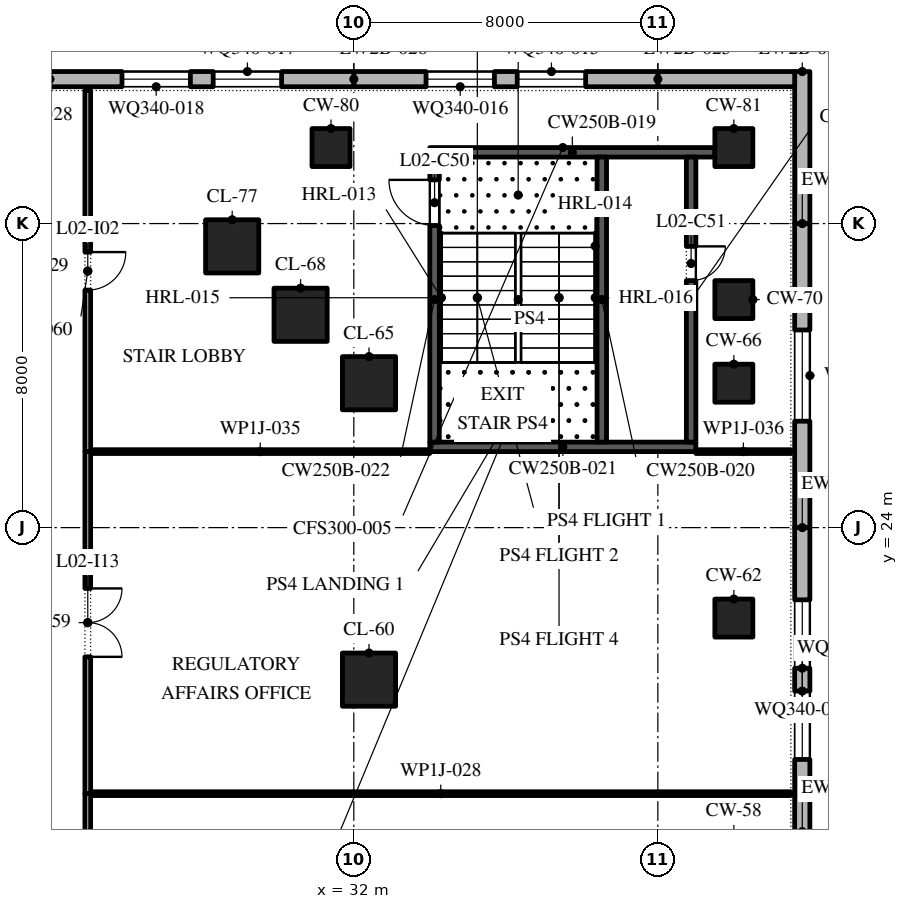
"""IFC4 building model, lengths in metres.
Left out: names, types, materials, properties, quantities, classifications, styles, units other than length and angle.
Written with IfcOpenShell. Run it as: python <this file> out.ifc"""

import sys

from ifc_helpers import new_model, si_unit, direction, frame, frame_2d, origin, origin_2d, place, context, subcontext, project, spatial, polyline, rectangle, outline, extrude, element, fill, save


model = new_model("IFC4")
c1 = context("Model", 3, precision=1e-05, world=origin(), true_north=direction((0.0, 1.0)))
c2 = subcontext(c1, "Body", "Model", "MODEL_VIEW")
j1 = project(units=[si_unit("LENGTHUNIT", "METRE"), si_unit("PLANEANGLEUNIT", "RADIAN")], contexts=[c1])
p1 = place(None, origin())
s1 = spatial("IfcSite", under=j1, at=p1, CompositionType="ELEMENT")
p2 = place(p1, origin())
s2 = spatial("IfcBuilding", under=s1, at=p2, CompositionType="ELEMENT")
p3 = place(p2, frame((0.0, 0.0, 14.0)))
s3 = spatial("IfcBuildingStorey", under=s2, at=p3, CompositionType="ELEMENT", Elevation=14.0)
p4 = place(p3, frame((32.4, 20.0, 0.0), z_axis=(0.0, 0.0, 1.0), x_axis=(1.0, 0.0, 0.0)))
e1 = element("IfcColumn", 1, at=p4, inside=s3, PredefinedType="COLUMN", context=c2, shape_type="SweptSolid", body=[
    extrude(rectangle(XDim=1.4, YDim=1.4, at=origin_2d()), origin(), (0.0, 0.0, 1.0), 5.2),
])
p5 = place(p3, frame((42.0, 21.62, 0.0), z_axis=(0.0, 0.0, 1.0), x_axis=(1.0, 0.0, 0.0)))
e2 = element("IfcColumn", 2, at=p5, inside=s3, PredefinedType="COLUMN", context=c2, shape_type="SweptSolid", body=[
    extrude(rectangle(XDim=1.0, YDim=1.0, at=origin_2d()), origin(), (0.0, 0.0, 1.0), 5.2),
])
p6 = place(p3, frame((32.4, 27.8, 0.0), z_axis=(0.0, 0.0, 1.0), x_axis=(1.0, 0.0, 0.0)))
e3 = element("IfcColumn", 3, at=p6, inside=s3, PredefinedType="COLUMN", context=c2, shape_type="SweptSolid", body=[
    extrude(rectangle(XDim=1.4, YDim=1.4, at=origin_2d()), origin(), (0.0, 0.0, 1.0), 5.2),
])
p7 = place(p3, frame((42.0, 27.8, 0.0), z_axis=(0.0, 0.0, 1.0), x_axis=(1.0, 0.0, 0.0)))
e4 = element("IfcColumn", 4, at=p7, inside=s3, PredefinedType="COLUMN", context=c2, shape_type="SweptSolid", body=[
    extrude(rectangle(XDim=1.0, YDim=1.0, at=origin_2d()), origin(), (0.0, 0.0, 1.0), 5.2),
])
p8 = place(p3, frame((30.6, 29.6, 0.0), z_axis=(0.0, 0.0, 1.0), x_axis=(1.0, 0.0, 0.0)))
e5 = element("IfcColumn", 5, at=p8, inside=s3, PredefinedType="COLUMN", context=c2, shape_type="SweptSolid", body=[
    extrude(rectangle(XDim=1.4, YDim=1.4, at=origin_2d()), origin(), (0.0, 0.0, 1.0), 5.2),
])
p9 = place(p3, frame((42.0, 30.0, 0.0), z_axis=(0.0, 0.0, 1.0), x_axis=(1.0, 0.0, 0.0)))
e6 = element("IfcColumn", 6, at=p9, inside=s3, PredefinedType="COLUMN", context=c2, shape_type="SweptSolid", body=[
    extrude(rectangle(XDim=1.0, YDim=1.0, at=origin_2d()), origin(), (0.0, 0.0, 1.0), 5.2),
])
p10 = place(p3, frame((28.8, 31.4, 0.0), z_axis=(0.0, 0.0, 1.0), x_axis=(1.0, 0.0, 0.0)))
e7 = element("IfcColumn", 7, at=p10, inside=s3, PredefinedType="COLUMN", context=c2, shape_type="SweptSolid", body=[
    extrude(rectangle(XDim=1.4, YDim=1.4, at=origin_2d()), origin(), (0.0, 0.0, 1.0), 5.2),
])
for number, where, z_axis, x_axis in (
    (8, (31.4, 34.0, 0.0), (0.0, 0.0, 1.0), (1.0, 0.0, 0.0)),
    (9, (42.0, 34.0, 0.0), (0.0, 0.0, 1.0), (1.0, 0.0, 0.0)),
):
    element("IfcColumn", number, at=place(p3, frame(where, z_axis=z_axis, x_axis=x_axis)), inside=s3, PredefinedType="COLUMN", context=c2, shape_type="SweptSolid", body=[
        extrude(rectangle(XDim=1.0, YDim=1.0, at=origin_2d()), origin(), (0.0, 0.0, 1.0), 5.2),
    ])
p11 = place(p3, frame((43.8, 16.0, 0.0), z_axis=(0.0, 0.0, 1.0), x_axis=(0.0, 1.0, 0.0)))
e10 = element("IfcWall", 10, at=p11, inside=s3, PredefinedType="STANDARD", context=c2, shape_type="SweptSolid", body=[
    extrude(rectangle(XDim=8.0, YDim=0.4, at=frame_2d((4.0, 0.0))), origin(), (0.0, 0.0, 1.0), 4.9),
])
p12 = place(p11, frame((1.9, 0.0, 0.9)))
e11 = element("IfcOpeningElement", 11, at=p12, cuts=e10, PredefinedType="OPENING", context=c2, shape_type="SweptSolid", body=[
    extrude(outline(polyline([(0.0, 0.0), (1.8, 0.0), (1.8, 1.841), (1.785, 2.076), (1.739, 2.307), (1.663, 2.53), (1.559, 2.741), (1.428, 2.937), (1.273, 3.114), (1.096, 3.269), (0.9, 3.4), (0.704, 3.269), (0.527, 3.114), (0.372, 2.937), (0.241, 2.741), (0.137, 2.53), (0.061, 2.307), (0.015, 2.076), (0.0, 1.841), (0.0, 0.0)])), frame((0.0, 0.21, 0.0), z_axis=(0.0, -1.0, 0.0), x_axis=(1.0, 0.0, 0.0)), (0.0, 0.0, 1.0), 0.42),
])
p13 = place(p11, frame((4.3, 0.0, 0.9)))
e12 = element("IfcOpeningElement", 12, at=p13, cuts=e10, PredefinedType="OPENING", context=c2, shape_type="SweptSolid", body=[
    extrude(outline(polyline([(0.0, 0.0), (1.8, 0.0), (1.8, 1.841), (1.785, 2.076), (1.739, 2.307), (1.663, 2.53), (1.559, 2.741), (1.428, 2.937), (1.273, 3.114), (1.096, 3.269), (0.9, 3.4), (0.704, 3.269), (0.527, 3.114), (0.372, 2.937), (0.241, 2.741), (0.137, 2.53), (0.061, 2.307), (0.015, 2.076), (0.0, 1.841), (0.0, 0.0)])), frame((0.0, 0.21, 0.0), z_axis=(0.0, -1.0, 0.0), x_axis=(1.0, 0.0, 0.0)), (0.0, 0.0, 1.0), 0.42),
])
p14 = place(p3, frame((43.8, 24.0, 0.0), z_axis=(0.0, 0.0, 1.0), x_axis=(0.0, 1.0, 0.0)))
e13 = element("IfcWall", 13, at=p14, inside=s3, PredefinedType="STANDARD", context=c2, shape_type="SweptSolid", body=[
    extrude(rectangle(XDim=8.0, YDim=0.4, at=frame_2d((4.0, 0.0))), origin(), (0.0, 0.0, 1.0), 4.9),
])
p15 = place(p14, frame((2.8, 0.0, 0.9)))
e14 = element("IfcOpeningElement", 14, at=p15, cuts=e13, PredefinedType="OPENING", context=c2, shape_type="SweptSolid", body=[
    extrude(outline(polyline([(0.0, 0.0), (2.4, 0.0), (2.4, 1.7), (2.379, 1.976), (2.315, 2.246), (2.212, 2.502), (2.07, 2.74), (1.893, 2.954), (1.686, 3.137), (1.453, 3.287), (1.2, 3.4), (0.947, 3.287), (0.714, 3.137), (0.507, 2.954), (0.33, 2.74), (0.188, 2.502), (0.084, 2.246), (0.021, 1.976), (0.0, 1.7), (0.0, 0.0)])), frame((0.0, 0.21, 0.0), z_axis=(0.0, -1.0, 0.0), x_axis=(1.0, 0.0, 0.0)), (0.0, 0.0, 1.0), 0.42),
])
p16 = place(p3, frame((43.8, 32.0, 0.0), z_axis=(0.0, 0.0, 1.0), x_axis=(0.0, 1.0, 0.0)))
e15 = element("IfcWall", 15, at=p16, inside=s3, PredefinedType="STANDARD", context=c2, shape_type="SweptSolid", body=[
    extrude(rectangle(XDim=4.0, YDim=0.4, at=frame_2d((2.0, 0.0))), origin(), (0.0, 0.0, 1.0), 4.9),
])
p17 = place(p3, frame((43.6, 35.8, 0.0), z_axis=(0.0, 0.0, 1.0), x_axis=(-1.0, 0.0, 0.0)))
e16 = element("IfcWall", 16, at=p17, inside=s3, PredefinedType="STANDARD", context=c2, shape_type="SweptSolid", body=[
    extrude(rectangle(XDim=3.6, YDim=0.4, at=frame_2d((1.8, 0.0))), origin(), (0.0, 0.0, 1.0), 4.9),
])
p18 = place(p3, frame((40.0, 35.8, 0.0), z_axis=(0.0, 0.0, 1.0), x_axis=(-1.0, 0.0, 0.0)))
e17 = element("IfcWall", 17, at=p18, inside=s3, PredefinedType="STANDARD", context=c2, shape_type="SweptSolid", body=[
    extrude(rectangle(XDim=8.0, YDim=0.4, at=frame_2d((4.0, 0.0))), origin(), (0.0, 0.0, 1.0), 4.9),
])
p19 = place(p18, frame((1.9, 0.0, 0.9)))
e18 = element("IfcOpeningElement", 18, at=p19, cuts=e17, PredefinedType="OPENING", context=c2, shape_type="SweptSolid", body=[
    extrude(outline(polyline([(0.0, 0.0), (1.8, 0.0), (1.8, 1.841), (1.785, 2.076), (1.739, 2.307), (1.663, 2.53), (1.559, 2.741), (1.428, 2.937), (1.273, 3.114), (1.096, 3.269), (0.9, 3.4), (0.704, 3.269), (0.527, 3.114), (0.372, 2.937), (0.241, 2.741), (0.137, 2.53), (0.061, 2.307), (0.015, 2.076), (0.0, 1.841), (0.0, 0.0)])), frame((0.0, 0.21, 0.0), z_axis=(0.0, -1.0, 0.0), x_axis=(1.0, 0.0, 0.0)), (0.0, 0.0, 1.0), 0.42),
])
p20 = place(p18, frame((4.3, 0.0, 0.9)))
e19 = element("IfcOpeningElement", 19, at=p20, cuts=e17, PredefinedType="OPENING", context=c2, shape_type="SweptSolid", body=[
    extrude(outline(polyline([(0.0, 0.0), (1.8, 0.0), (1.8, 1.841), (1.785, 2.076), (1.739, 2.307), (1.663, 2.53), (1.559, 2.741), (1.428, 2.937), (1.273, 3.114), (1.096, 3.269), (0.9, 3.4), (0.704, 3.269), (0.527, 3.114), (0.372, 2.937), (0.241, 2.741), (0.137, 2.53), (0.061, 2.307), (0.015, 2.076), (0.0, 1.841), (0.0, 0.0)])), frame((0.0, 0.21, 0.0), z_axis=(0.0, -1.0, 0.0), x_axis=(1.0, 0.0, 0.0)), (0.0, 0.0, 1.0), 0.42),
])
p21 = place(p3, frame((32.0, 35.8, 0.0), z_axis=(0.0, 0.0, 1.0), x_axis=(-1.0, 0.0, 0.0)))
e20 = element("IfcWall", 20, at=p21, inside=s3, PredefinedType="STANDARD", context=c2, shape_type="SweptSolid", body=[
    extrude(rectangle(XDim=8.0, YDim=0.4, at=frame_2d((4.0, 0.0))), origin(), (0.0, 0.0, 1.0), 4.9),
])
p22 = place(p21, frame((1.9, 0.0, 0.9)))
e21 = element("IfcOpeningElement", 21, at=p22, cuts=e20, PredefinedType="OPENING", context=c2, shape_type="SweptSolid", body=[
    extrude(outline(polyline([(0.0, 0.0), (1.8, 0.0), (1.8, 1.841), (1.785, 2.076), (1.739, 2.307), (1.663, 2.53), (1.559, 2.741), (1.428, 2.937), (1.273, 3.114), (1.096, 3.269), (0.9, 3.4), (0.704, 3.269), (0.527, 3.114), (0.372, 2.937), (0.241, 2.741), (0.137, 2.53), (0.061, 2.307), (0.015, 2.076), (0.0, 1.841), (0.0, 0.0)])), frame((0.0, 0.21, 0.0), z_axis=(0.0, -1.0, 0.0), x_axis=(1.0, 0.0, 0.0)), (0.0, 0.0, 1.0), 0.42),
])
p23 = place(p21, frame((4.3, 0.0, 0.9)))
e22 = element("IfcOpeningElement", 22, at=p23, cuts=e20, PredefinedType="OPENING", context=c2, shape_type="SweptSolid", body=[
    extrude(outline(polyline([(0.0, 0.0), (1.8, 0.0), (1.8, 1.841), (1.785, 2.076), (1.739, 2.307), (1.663, 2.53), (1.559, 2.741), (1.428, 2.937), (1.273, 3.114), (1.096, 3.269), (0.9, 3.4), (0.704, 3.269), (0.527, 3.114), (0.372, 2.937), (0.241, 2.741), (0.137, 2.53), (0.061, 2.307), (0.015, 2.076), (0.0, 1.841), (0.0, 0.0)])), frame((0.0, 0.21, 0.0), z_axis=(0.0, -1.0, 0.0), x_axis=(1.0, 0.0, 0.0)), (0.0, 0.0, 1.0), 0.42),
])
p24 = place(p3, frame((34.0, 26.125, 0.0), z_axis=(0.0, 0.0, 1.0), x_axis=(1.0, 0.0, 0.0)))
e23 = element("IfcWall", 23, at=p24, inside=s3, PredefinedType="SHEAR", context=c2, shape_type="SweptSolid", body=[
    extrude(rectangle(XDim=7.0, YDim=0.25, at=frame_2d((3.5, 0.0))), origin(), (0.0, 0.0, 1.0), 4.9),
])
p25 = place(p3, frame((34.0, 33.875, 0.0), z_axis=(0.0, 0.0, 1.0), x_axis=(1.0, 0.0, 0.0)))
e24 = element("IfcWall", 24, at=p25, inside=s3, PredefinedType="SHEAR", context=c2, shape_type="SweptSolid", body=[
    extrude(rectangle(XDim=7.5, YDim=0.25, at=frame_2d((3.75, 0.0))), origin(), (0.0, 0.0, 1.0), 4.9),
])
p26 = place(p3, frame((34.125, 26.25, 0.0), z_axis=(0.0, 0.0, 1.0), x_axis=(0.0, 1.0, 0.0)))
e25 = element("IfcWall", 25, at=p26, inside=s3, PredefinedType="SHEAR", context=c2, shape_type="SweptSolid", body=[
    extrude(rectangle(XDim=7.5, YDim=0.25, at=frame_2d((3.75, 0.0))), origin(), (0.0, 0.0, 1.0), 4.9),
])
p27 = place(p26, frame((5.7, 0.0, 0.0)))
e26 = element("IfcOpeningElement", 26, at=p27, cuts=e25, PredefinedType="OPENING", context=c2, shape_type="SweptSolid", body=[
    extrude(rectangle(XDim=1.2, YDim=2.1, at=frame_2d((0.6, 1.05))), frame((0.0, 0.135, 0.0), z_axis=(0.0, -1.0, 0.0), x_axis=(1.0, 0.0, 0.0)), (0.0, 0.0, 1.0), 0.27),
])
p28 = place(p3, frame((40.875, 26.25, 0.0), z_axis=(0.0, 0.0, 1.0), x_axis=(0.0, 1.0, 0.0)))
e27 = element("IfcWall", 27, at=p28, inside=s3, PredefinedType="SHEAR", context=c2, shape_type="SweptSolid", body=[
    extrude(rectangle(XDim=7.5, YDim=0.25, at=frame_2d((3.75, 0.0))), origin(), (0.0, 0.0, 1.0), 4.9),
])
p29 = place(p28, frame((4.25, 0.0, 0.0)))
e28 = element("IfcOpeningElement", 28, at=p29, cuts=e27, PredefinedType="OPENING", context=c2, shape_type="SweptSolid", body=[
    extrude(rectangle(XDim=0.9, YDim=2.1, at=frame_2d((0.45, 1.05))), frame((0.0, 0.135, 0.0), z_axis=(0.0, -1.0, 0.0), x_axis=(1.0, 0.0, 0.0)), (0.0, 0.0, 1.0), 0.27),
])
p30 = place(p3, frame((38.525, 26.25, 0.0), z_axis=(0.0, 0.0, 1.0), x_axis=(0.0, 1.0, 0.0)))
e29 = element("IfcWall", 29, at=p30, inside=s3, PredefinedType="SHEAR", context=c2, shape_type="SweptSolid", body=[
    extrude(rectangle(XDim=7.5, YDim=0.25, at=frame_2d((3.75, 0.0))), origin(), (0.0, 0.0, 1.0), 4.9),
])
p31 = place(p3, frame((25.075, 17.0, 0.0), z_axis=(0.0, 0.0, 1.0), x_axis=(1.0, 0.0, 0.0)))
e30 = element("IfcWall", 30, at=p31, inside=s3, PredefinedType="PARTITIONING", context=c2, shape_type="SweptSolid", body=[
    extrude(rectangle(XDim=18.425, YDim=0.1, at=frame_2d((9.212, 0.0))), origin(), (0.0, 0.0, 1.0), 4.9),
])
p32 = place(p3, frame((25.075, 26.0, 0.0), z_axis=(0.0, 0.0, 1.0), x_axis=(1.0, 0.0, 0.0)))
e31 = element("IfcWall", 31, at=p32, inside=s3, PredefinedType="PARTITIONING", context=c2, shape_type="SweptSolid", body=[
    extrude(rectangle(XDim=8.925, YDim=0.1, at=frame_2d((4.462, 0.0))), origin(), (0.0, 0.0, 1.0), 4.9),
])
p33 = place(p3, frame((41.0, 26.0, 0.0), z_axis=(0.0, 0.0, 1.0), x_axis=(1.0, 0.0, 0.0)))
e32 = element("IfcWall", 32, at=p33, inside=s3, PredefinedType="PARTITIONING", context=c2, shape_type="SweptSolid", body=[
    extrude(rectangle(XDim=2.5, YDim=0.1, at=frame_2d((1.25, 0.0))), origin(), (0.0, 0.0, 1.0), 4.9),
])
p34 = place(p3, frame((25.0, 8.0, 0.0), z_axis=(0.0, 0.0, 1.0), x_axis=(0.0, 1.0, 0.0)))
e33 = element("IfcWall", 33, at=p34, inside=s3, PredefinedType="PARTITIONING", context=c2, shape_type="SweptSolid", body=[
    extrude(rectangle(XDim=9.0, YDim=0.15, at=frame_2d((4.5, 0.0))), origin(), (0.0, 0.0, 1.0), 4.9),
])
p35 = place(p34, frame((3.6, 0.0, 0.0)))
e34 = element("IfcOpeningElement", 34, at=p35, cuts=e33, PredefinedType="OPENING", context=c2, shape_type="SweptSolid", body=[
    extrude(rectangle(XDim=1.8, YDim=2.1, at=frame_2d((0.9, 1.05))), frame((0.0, 0.085, 0.0), z_axis=(0.0, -1.0, 0.0), x_axis=(1.0, 0.0, 0.0)), (0.0, 0.0, 1.0), 0.17),
])
p36 = place(p3, frame((25.0, 17.0, 0.0), z_axis=(0.0, 0.0, 1.0), x_axis=(0.0, 1.0, 0.0)))
e35 = element("IfcWall", 35, at=p36, inside=s3, PredefinedType="PARTITIONING", context=c2, shape_type="SweptSolid", body=[
    extrude(rectangle(XDim=9.0, YDim=0.15, at=frame_2d((4.5, 0.0))), origin(), (0.0, 0.0, 1.0), 4.9),
])
p37 = place(p36, frame((3.6, 0.0, 0.0)))
e36 = element("IfcOpeningElement", 36, at=p37, cuts=e35, PredefinedType="OPENING", context=c2, shape_type="SweptSolid", body=[
    extrude(rectangle(XDim=1.8, YDim=2.1, at=frame_2d((0.9, 1.05))), frame((0.0, 0.085, 0.0), z_axis=(0.0, -1.0, 0.0), x_axis=(1.0, 0.0, 0.0)), (0.0, 0.0, 1.0), 0.17),
])
p38 = place(p3, frame((25.0, 26.0, 0.0), z_axis=(0.0, 0.0, 1.0), x_axis=(0.0, 1.0, 0.0)))
e37 = element("IfcWall", 37, at=p38, inside=s3, PredefinedType="PARTITIONING", context=c2, shape_type="SweptSolid", body=[
    extrude(rectangle(XDim=9.5, YDim=0.15, at=frame_2d((4.75, 0.0))), origin(), (0.0, 0.0, 1.0), 4.9),
])
p39 = place(p38, frame((4.25, 0.0, 0.0)))
e38 = element("IfcOpeningElement", 38, at=p39, cuts=e37, PredefinedType="OPENING", context=c2, shape_type="SweptSolid", body=[
    extrude(rectangle(XDim=1.0, YDim=2.1, at=frame_2d((0.5, 1.05))), frame((0.0, 0.085, 0.0), z_axis=(0.0, -1.0, 0.0), x_axis=(1.0, 0.0, 0.0)), (0.0, 0.0, 1.0), 0.17),
])
p40 = place(p12, origin())
e39 = element("IfcWindow", 39, at=p40, inside=s3, PartitioningType="DOUBLE_PANEL_VERTICAL", PredefinedType="WINDOW", context=c2, shape_type="SweptSolid", body=[
    extrude(outline(polyline([(0.0, 0.0), (1.8, 0.0), (1.8, 1.841), (1.785, 2.076), (1.739, 2.307), (1.663, 2.53), (1.559, 2.741), (1.428, 2.937), (1.273, 3.114), (1.096, 3.269), (0.9, 3.4), (0.704, 3.269), (0.527, 3.114), (0.372, 2.937), (0.241, 2.741), (0.137, 2.53), (0.061, 2.307), (0.015, 2.076), (0.0, 1.841), (0.0, 0.0)])), frame((0.0, 0.03, 0.0), z_axis=(0.0, -1.0, 0.0), x_axis=(1.0, 0.0, 0.0)), (0.0, 0.0, 1.0), 0.06),
])
fill(e11, e39)
p41 = place(p13, origin())
e40 = element("IfcWindow", 40, at=p41, inside=s3, PartitioningType="DOUBLE_PANEL_VERTICAL", PredefinedType="WINDOW", context=c2, shape_type="SweptSolid", body=[
    extrude(outline(polyline([(0.0, 0.0), (1.8, 0.0), (1.8, 1.841), (1.785, 2.076), (1.739, 2.307), (1.663, 2.53), (1.559, 2.741), (1.428, 2.937), (1.273, 3.114), (1.096, 3.269), (0.9, 3.4), (0.704, 3.269), (0.527, 3.114), (0.372, 2.937), (0.241, 2.741), (0.137, 2.53), (0.061, 2.307), (0.015, 2.076), (0.0, 1.841), (0.0, 0.0)])), frame((0.0, 0.03, 0.0), z_axis=(0.0, -1.0, 0.0), x_axis=(1.0, 0.0, 0.0)), (0.0, 0.0, 1.0), 0.06),
])
fill(e12, e40)
p42 = place(p15, origin())
e41 = element("IfcWindow", 41, at=p42, inside=s3, PartitioningType="DOUBLE_PANEL_VERTICAL", PredefinedType="WINDOW", context=c2, shape_type="SweptSolid", body=[
    extrude(outline(polyline([(0.0, 0.0), (2.4, 0.0), (2.4, 1.7), (2.379, 1.976), (2.315, 2.246), (2.212, 2.502), (2.07, 2.74), (1.893, 2.954), (1.686, 3.137), (1.453, 3.287), (1.2, 3.4), (0.947, 3.287), (0.714, 3.137), (0.507, 2.954), (0.33, 2.74), (0.188, 2.502), (0.084, 2.246), (0.021, 1.976), (0.0, 1.7), (0.0, 0.0)])), frame((0.0, 0.03, 0.0), z_axis=(0.0, -1.0, 0.0), x_axis=(1.0, 0.0, 0.0)), (0.0, 0.0, 1.0), 0.06),
])
fill(e14, e41)
p43 = place(p19, origin())
e42 = element("IfcWindow", 42, at=p43, inside=s3, PartitioningType="DOUBLE_PANEL_VERTICAL", PredefinedType="WINDOW", context=c2, shape_type="SweptSolid", body=[
    extrude(outline(polyline([(0.0, 0.0), (1.8, 0.0), (1.8, 1.841), (1.785, 2.076), (1.739, 2.307), (1.663, 2.53), (1.559, 2.741), (1.428, 2.937), (1.273, 3.114), (1.096, 3.269), (0.9, 3.4), (0.704, 3.269), (0.527, 3.114), (0.372, 2.937), (0.241, 2.741), (0.137, 2.53), (0.061, 2.307), (0.015, 2.076), (0.0, 1.841), (0.0, 0.0)])), frame((0.0, 0.03, 0.0), z_axis=(0.0, -1.0, 0.0), x_axis=(1.0, 0.0, 0.0)), (0.0, 0.0, 1.0), 0.06),
])
fill(e18, e42)
p44 = place(p20, origin())
e43 = element("IfcWindow", 43, at=p44, inside=s3, PartitioningType="DOUBLE_PANEL_VERTICAL", PredefinedType="WINDOW", context=c2, shape_type="SweptSolid", body=[
    extrude(outline(polyline([(0.0, 0.0), (1.8, 0.0), (1.8, 1.841), (1.785, 2.076), (1.739, 2.307), (1.663, 2.53), (1.559, 2.741), (1.428, 2.937), (1.273, 3.114), (1.096, 3.269), (0.9, 3.4), (0.704, 3.269), (0.527, 3.114), (0.372, 2.937), (0.241, 2.741), (0.137, 2.53), (0.061, 2.307), (0.015, 2.076), (0.0, 1.841), (0.0, 0.0)])), frame((0.0, 0.03, 0.0), z_axis=(0.0, -1.0, 0.0), x_axis=(1.0, 0.0, 0.0)), (0.0, 0.0, 1.0), 0.06),
])
fill(e19, e43)
p45 = place(p22, origin())
e44 = element("IfcWindow", 44, at=p45, inside=s3, PartitioningType="DOUBLE_PANEL_VERTICAL", PredefinedType="WINDOW", context=c2, shape_type="SweptSolid", body=[
    extrude(outline(polyline([(0.0, 0.0), (1.8, 0.0), (1.8, 1.841), (1.785, 2.076), (1.739, 2.307), (1.663, 2.53), (1.559, 2.741), (1.428, 2.937), (1.273, 3.114), (1.096, 3.269), (0.9, 3.4), (0.704, 3.269), (0.527, 3.114), (0.372, 2.937), (0.241, 2.741), (0.137, 2.53), (0.061, 2.307), (0.015, 2.076), (0.0, 1.841), (0.0, 0.0)])), frame((0.0, 0.03, 0.0), z_axis=(0.0, -1.0, 0.0), x_axis=(1.0, 0.0, 0.0)), (0.0, 0.0, 1.0), 0.06),
])
fill(e21, e44)
p46 = place(p23, origin())
e45 = element("IfcWindow", 45, at=p46, inside=s3, PartitioningType="DOUBLE_PANEL_VERTICAL", PredefinedType="WINDOW", context=c2, shape_type="SweptSolid", body=[
    extrude(outline(polyline([(0.0, 0.0), (1.8, 0.0), (1.8, 1.841), (1.785, 2.076), (1.739, 2.307), (1.663, 2.53), (1.559, 2.741), (1.428, 2.937), (1.273, 3.114), (1.096, 3.269), (0.9, 3.4), (0.704, 3.269), (0.527, 3.114), (0.372, 2.937), (0.241, 2.741), (0.137, 2.53), (0.061, 2.307), (0.015, 2.076), (0.0, 1.841), (0.0, 0.0)])), frame((0.0, 0.03, 0.0), z_axis=(0.0, -1.0, 0.0), x_axis=(1.0, 0.0, 0.0)), (0.0, 0.0, 1.0), 0.06),
])
fill(e22, e45)
p47 = place(p27, origin())
e46 = element("IfcDoor", 46, at=p47, inside=s3, OperationType="SINGLE_SWING_LEFT", PredefinedType="DOOR", context=c2, shape_type="SweptSolid", body=[
    extrude(rectangle(XDim=1.2, YDim=2.1, at=frame_2d((0.6, 1.05))), frame((0.0, 0.025, 0.0), z_axis=(0.0, -1.0, 0.0), x_axis=(1.0, 0.0, 0.0)), (0.0, 0.0, 1.0), 0.05),
])
fill(e26, e46)
p48 = place(p29, frame((0.9, 0.2, 0.0), z_axis=(0.0, 0.0, 1.0), x_axis=(-1.0, 0.0, 0.0)))
e47 = element("IfcDoor", 47, at=p48, inside=s3, OperationType="SINGLE_SWING_RIGHT", PredefinedType="DOOR", context=c2, shape_type="SweptSolid", body=[
    extrude(rectangle(XDim=0.9, YDim=2.1, at=frame_2d((0.45, 1.05))), frame((0.0, 0.125, 0.0), z_axis=(0.0, -1.0, 0.0), x_axis=(1.0, 0.0, 0.0)), (0.0, 0.0, 1.0), 0.05),
])
fill(e28, e47)
p49 = place(p39, frame((1.0, 0.0, 0.0), z_axis=(0.0, 0.0, 1.0), x_axis=(-1.0, 0.0, 0.0)))
e48 = element("IfcDoor", 48, at=p49, inside=s3, OperationType="SINGLE_SWING_RIGHT", PredefinedType="DOOR", context=c2, shape_type="SweptSolid", body=[
    extrude(rectangle(XDim=1.0, YDim=2.1, at=frame_2d((0.5, 1.05))), frame((0.0, 0.025, 0.0), z_axis=(0.0, -1.0, 0.0), x_axis=(1.0, 0.0, 0.0)), (0.0, 0.0, 1.0), 0.05),
])
fill(e38, e48)
p50 = place(p37, frame((1.8, 0.0, 0.0), z_axis=(0.0, 0.0, 1.0), x_axis=(-1.0, 0.0, 0.0)))
e49 = element("IfcDoor", 49, at=p50, inside=s3, OperationType="SINGLE_SWING_LEFT", PredefinedType="DOOR", context=c2, shape_type="SweptSolid", body=[
    extrude(rectangle(XDim=1.8, YDim=2.1, at=frame_2d((0.9, 1.05))), frame((0.0, 0.025, 0.0), z_axis=(0.0, -1.0, 0.0), x_axis=(1.0, 0.0, 0.0)), (0.0, 0.0, 1.0), 0.05),
])
fill(e36, e49)
save(model, sys.argv[1])
